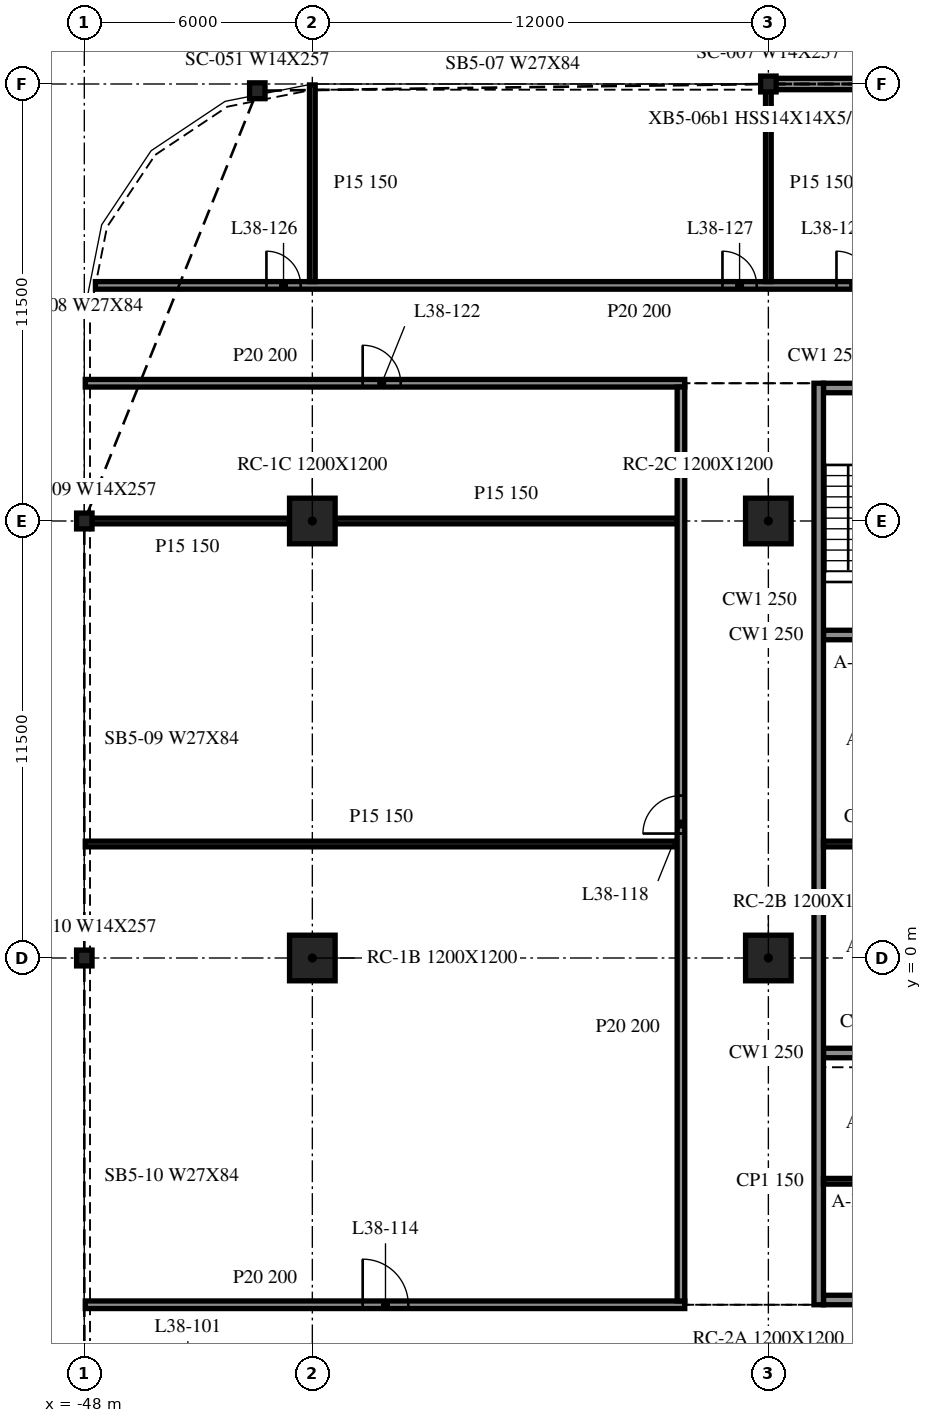
"""IFC4 building model, lengths in metres.
Left out: names, types, materials, properties, quantities, classifications, styles, units other than length and angle.
Written with IfcOpenShell. Run it as: python <this file> out.ifc"""

import sys

from ifc_helpers import new_model, si_unit, direction, frame, frame_2d, origin, origin_2d, place, context, subcontext, project, spatial, rectangle, i_section, extrude, element, fill, save


model = new_model("IFC4")
c1 = context("Model", 3, precision=1e-05, world=origin(), true_north=direction((0.0, 1.0)))
c2 = subcontext(c1, "Body", "Model", "MODEL_VIEW")
j1 = project(units=[si_unit("LENGTHUNIT", "METRE"), si_unit("PLANEANGLEUNIT", "RADIAN")], contexts=[c1])
p1 = place(None, origin())
s1 = spatial("IfcSite", under=j1, at=p1, CompositionType="ELEMENT")
p2 = place(p1, origin())
s2 = spatial("IfcBuilding", under=s1, at=p2, CompositionType="ELEMENT")
p3 = place(p2, frame((0.0, 0.0, 163.0)))
s3 = spatial("IfcBuildingStorey", under=s2, at=p3, CompositionType="ELEMENT", Elevation=163.0)
for number, where, z_axis, x_axis in (
    (1, (-42.0, 0.0, -0.34), (0.0, 0.0, 1.0), (1.0, 0.0, 0.0)),
    (2, (-42.0, 11.5, -0.34), (0.0, 0.0, 1.0), (1.0, 0.0, 0.0)),
    (3, (-30.0, 0.0, -0.34), (0.0, 0.0, 1.0), (1.0, 0.0, 0.0)),
    (4, (-30.0, 11.5, -0.34), (0.0, 0.0, 1.0), (1.0, 0.0, 0.0)),
):
    element("IfcColumn", number, at=place(p3, frame(where, z_axis=z_axis, x_axis=x_axis)), inside=s3, PredefinedType="COLUMN", context=c2, shape_type="SweptSolid", body=[
        extrude(rectangle(XDim=1.2, YDim=1.2, at=origin_2d()), origin(), (0.0, 0.0, 1.0), 3.8),
    ])
for number, where, z_axis, x_axis in (
    (5, (-30.0, 23.0, -0.34), (0.0, 0.0, 1.0), (1.0, 0.0, 0.0)),
    (6, (-43.448, 22.822, -0.34), (0.0, 0.0, 1.0), (1.0, 0.0, 0.0)),
    (7, (-48.0, 11.5, -0.34), (0.0, 0.0, 1.0), (1.0, 0.0, 0.0)),
    (8, (-48.0, 0.0, -0.34), (0.0, 0.0, 1.0), (1.0, 0.0, 0.0)),
):
    element("IfcColumn", number, at=place(p3, frame(where, z_axis=z_axis, x_axis=x_axis)), inside=s3, PredefinedType="COLUMN", context=c2, shape_type="SweptSolid", body=[
        extrude(i_section(OverallWidth=0.406, OverallDepth=0.417, WebThickness=0.03, FlangeThickness=0.048, at=origin_2d()), origin(), (0.0, 0.0, 1.0), 3.8),
    ])
p4 = place(p3, frame((-18.015, 23.0, 0.0), z_axis=(0.0, 0.0, 1.0), x_axis=(-1.0, 0.0, 0.0)))
e9 = element("IfcWall", 9, at=p4, inside=s3, PredefinedType="NOTDEFINED", context=c2, shape_type="SweptSolid", body=[
    extrude(rectangle(XDim=11.97, YDim=0.3, at=frame_2d((5.985, 0.0))), origin(), (0.0, 0.0, 1.0), 2.782),
])
p5 = place(p3, frame((-28.675, 15.125, 0.0), z_axis=(0.0, 0.0, 1.0), x_axis=(0.0, -1.0, 0.0)))
e10 = element("IfcWall", 10, at=p5, inside=s3, PredefinedType="SOLIDWALL", context=c2, shape_type="SweptSolid", body=[
    extrude(rectangle(XDim=24.25, YDim=0.25, at=frame_2d((12.125, 0.0))), origin(), (0.0, 0.0, 1.0), 3.46),
])
p6 = place(p3, frame((-19.45, -9.0, 0.0), z_axis=(0.0, 0.0, 1.0), x_axis=(-1.0, 0.0, 0.0)))
e11 = element("IfcWall", 11, at=p6, inside=s3, PredefinedType="SOLIDWALL", context=c2, shape_type="SweptSolid", body=[
    extrude(rectangle(XDim=9.1, YDim=0.25, at=frame_2d((4.55, 0.0))), origin(), (0.0, 0.0, 1.0), 3.46),
])
p7 = place(p6, frame((3.65, 0.0, 0.0)))
e12 = element("IfcOpeningElement", 12, at=p7, cuts=e11, PredefinedType="OPENING", context=c2, shape_type="SweptSolid", body=[
    extrude(rectangle(XDim=1.8, YDim=2.1, at=frame_2d((0.9, 1.05))), frame((0.0, 0.135, 0.0), z_axis=(0.0, -1.0, 0.0), x_axis=(1.0, 0.0, 0.0)), (0.0, 0.0, 1.0), 0.27),
])
p8 = place(p3, frame((-28.55, 15.0, 0.0), z_axis=(0.0, 0.0, 1.0), x_axis=(1.0, 0.0, 0.0)))
e13 = element("IfcWall", 13, at=p8, inside=s3, PredefinedType="SOLIDWALL", context=c2, shape_type="SweptSolid", body=[
    extrude(rectangle(XDim=9.1, YDim=0.25, at=frame_2d((4.55, 0.0))), origin(), (0.0, 0.0, 1.0), 3.46),
])
p9 = place(p8, frame((3.65, 0.0, 0.0)))
e14 = element("IfcOpeningElement", 14, at=p9, cuts=e13, PredefinedType="OPENING", context=c2, shape_type="SweptSolid", body=[
    extrude(rectangle(XDim=1.8, YDim=2.1, at=frame_2d((0.9, 1.05))), frame((0.0, 0.135, 0.0), z_axis=(0.0, -1.0, 0.0), x_axis=(1.0, 0.0, 0.0)), (0.0, 0.0, 1.0), 0.27),
])
for number, where, z_axis, x_axis in (
    (15, (-28.55, -2.5, 0.0), (0.0, 0.0, 1.0), (1.0, 0.0, 0.0)),
    (16, (-28.55, 8.5, 0.0), (0.0, 0.0, 1.0), (1.0, 0.0, 0.0)),
):
    element("IfcWall", number, at=place(p3, frame(where, z_axis=z_axis, x_axis=x_axis)), inside=s3, PredefinedType="SOLIDWALL", context=c2, shape_type="SweptSolid", body=[
        extrude(rectangle(XDim=2.85, YDim=0.25, at=frame_2d((1.425, 0.0))), origin(), (0.0, 0.0, 1.0), 3.46),
    ])
for number, where, z_axis, x_axis in (
    (17, (-28.55, 3.0, 0.0), (0.0, 0.0, 1.0), (1.0, 0.0, 0.0)),
    (18, (-28.55, -5.875, 0.0), (0.0, 0.0, 1.0), (1.0, 0.0, 0.0)),
):
    element("IfcWall", number, at=place(p3, frame(where, z_axis=z_axis, x_axis=x_axis)), inside=s3, PredefinedType="PARTITIONING", context=c2, shape_type="SweptSolid", body=[
        extrude(rectangle(XDim=2.85, YDim=0.15, at=frame_2d((1.425, 0.0))), origin(), (0.0, 0.0, 1.0), 3.46),
    ])
p10 = place(p3, frame((-47.975, -9.125, 0.0), z_axis=(0.0, 0.0, 1.0), x_axis=(1.0, 0.0, 0.0)))
e19 = element("IfcWall", 19, at=p10, inside=s3, PredefinedType="PARTITIONING", context=c2, shape_type="SweptSolid", body=[
    extrude(rectangle(XDim=15.775, YDim=0.2, at=frame_2d((7.888, 0.0))), origin(), (0.0, 0.0, 1.0), 3.46),
])
p11 = place(p10, frame((7.3, 0.0, 0.0)))
e20 = element("IfcOpeningElement", 20, at=p11, cuts=e19, PredefinedType="OPENING", context=c2, shape_type="SweptSolid", body=[
    extrude(rectangle(XDim=1.2, YDim=2.1, at=frame_2d((0.6, 1.05))), frame((0.0, 0.11, 0.0), z_axis=(0.0, -1.0, 0.0), x_axis=(1.0, 0.0, 0.0)), (0.0, 0.0, 1.0), 0.22),
])
p12 = place(p3, frame((-47.975, 3.0, 0.0), z_axis=(0.0, 0.0, 1.0), x_axis=(1.0, 0.0, 0.0)))
e21 = element("IfcWall", 21, at=p12, inside=s3, PredefinedType="PARTITIONING", context=c2, shape_type="SweptSolid", body=[
    extrude(rectangle(XDim=15.575, YDim=0.15, at=frame_2d((7.788, 0.0))), origin(), (0.0, 0.0, 1.0), 3.46),
])
p13 = place(p3, frame((-47.975, 11.5, 0.0), z_axis=(0.0, 0.0, 1.0), x_axis=(1.0, 0.0, 0.0)))
e22 = element("IfcWall", 22, at=p13, inside=s3, PredefinedType="PARTITIONING", context=c2, shape_type="SweptSolid", body=[
    extrude(rectangle(XDim=5.375, YDim=0.15, at=frame_2d((2.688, 0.0))), origin(), (0.0, 0.0, 1.0), 3.46),
])
p14 = place(p3, frame((-41.4, 11.5, 0.0), z_axis=(0.0, 0.0, 1.0), x_axis=(1.0, 0.0, 0.0)))
e23 = element("IfcWall", 23, at=p14, inside=s3, PredefinedType="PARTITIONING", context=c2, shape_type="SweptSolid", body=[
    extrude(rectangle(XDim=9.0, YDim=0.15, at=frame_2d((4.5, 0.0))), origin(), (0.0, 0.0, 1.0), 3.46),
])
p15 = place(p3, frame((-47.975, 15.125, 0.0), z_axis=(0.0, 0.0, 1.0), x_axis=(1.0, 0.0, 0.0)))
e24 = element("IfcWall", 24, at=p15, inside=s3, PredefinedType="PARTITIONING", context=c2, shape_type="SweptSolid", body=[
    extrude(rectangle(XDim=15.775, YDim=0.2, at=frame_2d((7.888, 0.0))), origin(), (0.0, 0.0, 1.0), 3.46),
])
p16 = place(p15, frame((7.3, 0.0, 0.0)))
e25 = element("IfcOpeningElement", 25, at=p16, cuts=e24, PredefinedType="OPENING", context=c2, shape_type="SweptSolid", body=[
    extrude(rectangle(XDim=1.0, YDim=2.1, at=frame_2d((0.5, 1.05))), frame((0.0, 0.11, 0.0), z_axis=(0.0, -1.0, 0.0), x_axis=(1.0, 0.0, 0.0)), (0.0, 0.0, 1.0), 0.22),
])
p17 = place(p3, frame((-47.708, 17.7, 0.0), z_axis=(0.0, 0.0, 1.0), x_axis=(1.0, 0.0, 0.0)))
e26 = element("IfcWall", 26, at=p17, inside=s3, PredefinedType="PARTITIONING", context=c2, shape_type="SweptSolid", body=[
    extrude(rectangle(XDim=95.416, YDim=0.2, at=frame_2d((47.708, 0.0))), origin(), (0.0, 0.0, 1.0), 3.46),
])
p18 = place(p17, frame((4.5, 0.0, 0.0)))
e27 = element("IfcOpeningElement", 27, at=p18, cuts=e26, PredefinedType="OPENING", context=c2, shape_type="SweptSolid", body=[
    extrude(rectangle(XDim=0.9, YDim=2.1, at=frame_2d((0.45, 1.05))), frame((0.0, 0.11, 0.0), z_axis=(0.0, -1.0, 0.0), x_axis=(1.0, 0.0, 0.0)), (0.0, 0.0, 1.0), 0.22),
])
p19 = place(p17, frame((16.5, 0.0, 0.0)))
e28 = element("IfcOpeningElement", 28, at=p19, cuts=e26, PredefinedType="OPENING", context=c2, shape_type="SweptSolid", body=[
    extrude(rectangle(XDim=0.9, YDim=2.1, at=frame_2d((0.45, 1.05))), frame((0.0, 0.11, 0.0), z_axis=(0.0, -1.0, 0.0), x_axis=(1.0, 0.0, 0.0)), (0.0, 0.0, 1.0), 0.22),
])
p20 = place(p17, frame((19.5, 0.0, 0.0)))
e29 = element("IfcOpeningElement", 29, at=p20, cuts=e26, PredefinedType="OPENING", context=c2, shape_type="SweptSolid", body=[
    extrude(rectangle(XDim=0.9, YDim=2.1, at=frame_2d((0.45, 1.05))), frame((0.0, 0.11, 0.0), z_axis=(0.0, -1.0, 0.0), x_axis=(1.0, 0.0, 0.0)), (0.0, 0.0, 1.0), 0.22),
])
p21 = place(p17, frame((22.5, 0.0, 0.0)))
e30 = element("IfcOpeningElement", 30, at=p21, cuts=e26, PredefinedType="OPENING", context=c2, shape_type="SweptSolid", body=[
    extrude(rectangle(XDim=0.9, YDim=2.1, at=frame_2d((0.45, 1.05))), frame((0.0, 0.11, 0.0), z_axis=(0.0, -1.0, 0.0), x_axis=(1.0, 0.0, 0.0)), (0.0, 0.0, 1.0), 0.22),
])
p22 = place(p17, frame((28.5, 0.0, 0.0)))
e31 = element("IfcOpeningElement", 31, at=p22, cuts=e26, PredefinedType="OPENING", context=c2, shape_type="SweptSolid", body=[
    extrude(rectangle(XDim=0.9, YDim=2.1, at=frame_2d((0.45, 1.05))), frame((0.0, 0.11, 0.0), z_axis=(0.0, -1.0, 0.0), x_axis=(1.0, 0.0, 0.0)), (0.0, 0.0, 1.0), 0.22),
])
p23 = place(p17, frame((40.5, 0.0, 0.0)))
e32 = element("IfcOpeningElement", 32, at=p23, cuts=e26, PredefinedType="OPENING", context=c2, shape_type="SweptSolid", body=[
    extrude(rectangle(XDim=0.9, YDim=2.1, at=frame_2d((0.45, 1.05))), frame((0.0, 0.11, 0.0), z_axis=(0.0, -1.0, 0.0), x_axis=(1.0, 0.0, 0.0)), (0.0, 0.0, 1.0), 0.22),
])
p24 = place(p17, frame((43.5, 0.0, 0.0)))
e33 = element("IfcOpeningElement", 33, at=p24, cuts=e26, PredefinedType="OPENING", context=c2, shape_type="SweptSolid", body=[
    extrude(rectangle(XDim=0.9, YDim=2.1, at=frame_2d((0.45, 1.05))), frame((0.0, 0.11, 0.0), z_axis=(0.0, -1.0, 0.0), x_axis=(1.0, 0.0, 0.0)), (0.0, 0.0, 1.0), 0.22),
])
p25 = place(p17, frame((46.5, 0.0, 0.0)))
e34 = element("IfcOpeningElement", 34, at=p25, cuts=e26, PredefinedType="OPENING", context=c2, shape_type="SweptSolid", body=[
    extrude(rectangle(XDim=0.9, YDim=2.1, at=frame_2d((0.45, 1.05))), frame((0.0, 0.11, 0.0), z_axis=(0.0, -1.0, 0.0), x_axis=(1.0, 0.0, 0.0)), (0.0, 0.0, 1.0), 0.22),
])
p26 = place(p17, frame((48.1, 0.0, 0.0)))
e35 = element("IfcOpeningElement", 35, at=p26, cuts=e26, PredefinedType="OPENING", context=c2, shape_type="SweptSolid", body=[
    extrude(rectangle(XDim=0.9, YDim=2.1, at=frame_2d((0.45, 1.05))), frame((0.0, 0.11, 0.0), z_axis=(0.0, -1.0, 0.0), x_axis=(1.0, 0.0, 0.0)), (0.0, 0.0, 1.0), 0.22),
])
p27 = place(p17, frame((54.1, 0.0, 0.0)))
e36 = element("IfcOpeningElement", 36, at=p27, cuts=e26, PredefinedType="OPENING", context=c2, shape_type="SweptSolid", body=[
    extrude(rectangle(XDim=0.9, YDim=2.1, at=frame_2d((0.45, 1.05))), frame((0.0, 0.11, 0.0), z_axis=(0.0, -1.0, 0.0), x_axis=(1.0, 0.0, 0.0)), (0.0, 0.0, 1.0), 0.22),
])
p28 = place(p17, frame((66.1, 0.0, 0.0)))
e37 = element("IfcOpeningElement", 37, at=p28, cuts=e26, PredefinedType="OPENING", context=c2, shape_type="SweptSolid", body=[
    extrude(rectangle(XDim=0.9, YDim=2.1, at=frame_2d((0.45, 1.05))), frame((0.0, 0.11, 0.0), z_axis=(0.0, -1.0, 0.0), x_axis=(1.0, 0.0, 0.0)), (0.0, 0.0, 1.0), 0.22),
])
p29 = place(p17, frame((69.1, 0.0, 0.0)))
e38 = element("IfcOpeningElement", 38, at=p29, cuts=e26, PredefinedType="OPENING", context=c2, shape_type="SweptSolid", body=[
    extrude(rectangle(XDim=0.9, YDim=2.1, at=frame_2d((0.45, 1.05))), frame((0.0, 0.11, 0.0), z_axis=(0.0, -1.0, 0.0), x_axis=(1.0, 0.0, 0.0)), (0.0, 0.0, 1.0), 0.22),
])
p30 = place(p17, frame((72.1, 0.0, 0.0)))
e39 = element("IfcOpeningElement", 39, at=p30, cuts=e26, PredefinedType="OPENING", context=c2, shape_type="SweptSolid", body=[
    extrude(rectangle(XDim=0.9, YDim=2.1, at=frame_2d((0.45, 1.05))), frame((0.0, 0.11, 0.0), z_axis=(0.0, -1.0, 0.0), x_axis=(1.0, 0.0, 0.0)), (0.0, 0.0, 1.0), 0.22),
])
p31 = place(p17, frame((78.1, 0.0, 0.0)))
e40 = element("IfcOpeningElement", 40, at=p31, cuts=e26, PredefinedType="OPENING", context=c2, shape_type="SweptSolid", body=[
    extrude(rectangle(XDim=0.9, YDim=2.1, at=frame_2d((0.45, 1.05))), frame((0.0, 0.11, 0.0), z_axis=(0.0, -1.0, 0.0), x_axis=(1.0, 0.0, 0.0)), (0.0, 0.0, 1.0), 0.22),
])
p32 = place(p17, frame((90.1, 0.0, 0.0)))
e41 = element("IfcOpeningElement", 41, at=p32, cuts=e26, PredefinedType="OPENING", context=c2, shape_type="SweptSolid", body=[
    extrude(rectangle(XDim=0.9, YDim=2.1, at=frame_2d((0.45, 1.05))), frame((0.0, 0.11, 0.0), z_axis=(0.0, -1.0, 0.0), x_axis=(1.0, 0.0, 0.0)), (0.0, 0.0, 1.0), 0.22),
])
p33 = place(p3, frame((-42.0, 17.8, 0.0), z_axis=(0.0, 0.0, 1.0), x_axis=(0.0, 1.0, 0.0)))
e42 = element("IfcWall", 42, at=p33, inside=s3, PredefinedType="PARTITIONING", context=c2, shape_type="SweptSolid", body=[
    extrude(rectangle(XDim=5.175, YDim=0.15, at=frame_2d((2.587, 0.0))), origin(), (0.0, 0.0, 1.0), 3.46),
])
p34 = place(p3, frame((-32.3, -9.025, 0.0), z_axis=(0.0, 0.0, 1.0), x_axis=(0.0, 1.0, 0.0)))
e43 = element("IfcWall", 43, at=p34, inside=s3, PredefinedType="PARTITIONING", context=c2, shape_type="SweptSolid", body=[
    extrude(rectangle(XDim=24.05, YDim=0.2, at=frame_2d((12.025, 0.0))), origin(), (0.0, 0.0, 1.0), 3.46),
])
p35 = place(p34, frame((12.3, 0.0, 0.0)))
e44 = element("IfcOpeningElement", 44, at=p35, cuts=e43, PredefinedType="OPENING", context=c2, shape_type="SweptSolid", body=[
    extrude(rectangle(XDim=1.0, YDim=2.1, at=frame_2d((0.5, 1.05))), frame((0.0, 0.11, 0.0), z_axis=(0.0, -1.0, 0.0), x_axis=(1.0, 0.0, 0.0)), (0.0, 0.0, 1.0), 0.22),
])
p36 = place(p3, frame((-30.0, 17.8, 0.0), z_axis=(0.0, 0.0, 1.0), x_axis=(0.0, 1.0, 0.0)))
e45 = element("IfcWall", 45, at=p36, inside=s3, PredefinedType="PARTITIONING", context=c2, shape_type="SweptSolid", body=[
    extrude(rectangle(XDim=5.175, YDim=0.15, at=frame_2d((2.587, 0.0))), origin(), (0.0, 0.0, 1.0), 3.46),
])
p37 = place(p11, origin())
e46 = element("IfcDoor", 46, at=p37, inside=s3, OperationType="SINGLE_SWING_RIGHT", PredefinedType="DOOR", context=c2, shape_type="SweptSolid", body=[
    extrude(rectangle(XDim=1.2, YDim=2.1, at=frame_2d((0.6, 1.05))), frame((0.0, 0.025, 0.0), z_axis=(0.0, -1.0, 0.0), x_axis=(1.0, 0.0, 0.0)), (0.0, 0.0, 1.0), 0.05),
])
fill(e20, e46)
p38 = place(p35, origin())
e47 = element("IfcDoor", 47, at=p38, inside=s3, OperationType="SINGLE_SWING_RIGHT", PredefinedType="DOOR", context=c2, shape_type="SweptSolid", body=[
    extrude(rectangle(XDim=1.0, YDim=2.1, at=frame_2d((0.5, 1.05))), frame((0.0, 0.025, 0.0), z_axis=(0.0, -1.0, 0.0), x_axis=(1.0, 0.0, 0.0)), (0.0, 0.0, 1.0), 0.05),
])
fill(e44, e47)
p39 = place(p16, origin())
e48 = element("IfcDoor", 48, at=p39, inside=s3, OperationType="SINGLE_SWING_RIGHT", PredefinedType="DOOR", context=c2, shape_type="SweptSolid", body=[
    extrude(rectangle(XDim=1.0, YDim=2.1, at=frame_2d((0.5, 1.05))), frame((0.0, 0.025, 0.0), z_axis=(0.0, -1.0, 0.0), x_axis=(1.0, 0.0, 0.0)), (0.0, 0.0, 1.0), 0.05),
])
fill(e25, e48)
p40 = place(p18, origin())
e49 = element("IfcDoor", 49, at=p40, inside=s3, OperationType="SINGLE_SWING_LEFT", PredefinedType="DOOR", context=c2, shape_type="SweptSolid", body=[
    extrude(rectangle(XDim=0.9, YDim=2.1, at=frame_2d((0.45, 1.05))), frame((0.0, 0.025, 0.0), z_axis=(0.0, -1.0, 0.0), x_axis=(1.0, 0.0, 0.0)), (0.0, 0.0, 1.0), 0.05),
])
fill(e27, e49)
p41 = place(p19, origin())
e50 = element("IfcDoor", 50, at=p41, inside=s3, OperationType="SINGLE_SWING_LEFT", PredefinedType="DOOR", context=c2, shape_type="SweptSolid", body=[
    extrude(rectangle(XDim=0.9, YDim=2.1, at=frame_2d((0.45, 1.05))), frame((0.0, 0.025, 0.0), z_axis=(0.0, -1.0, 0.0), x_axis=(1.0, 0.0, 0.0)), (0.0, 0.0, 1.0), 0.05),
])
fill(e28, e50)
p42 = place(p20, origin())
e51 = element("IfcDoor", 51, at=p42, inside=s3, OperationType="SINGLE_SWING_LEFT", PredefinedType="DOOR", context=c2, shape_type="SweptSolid", body=[
    extrude(rectangle(XDim=0.9, YDim=2.1, at=frame_2d((0.45, 1.05))), frame((0.0, 0.025, 0.0), z_axis=(0.0, -1.0, 0.0), x_axis=(1.0, 0.0, 0.0)), (0.0, 0.0, 1.0), 0.05),
])
fill(e29, e51)
save(model, sys.argv[1])
